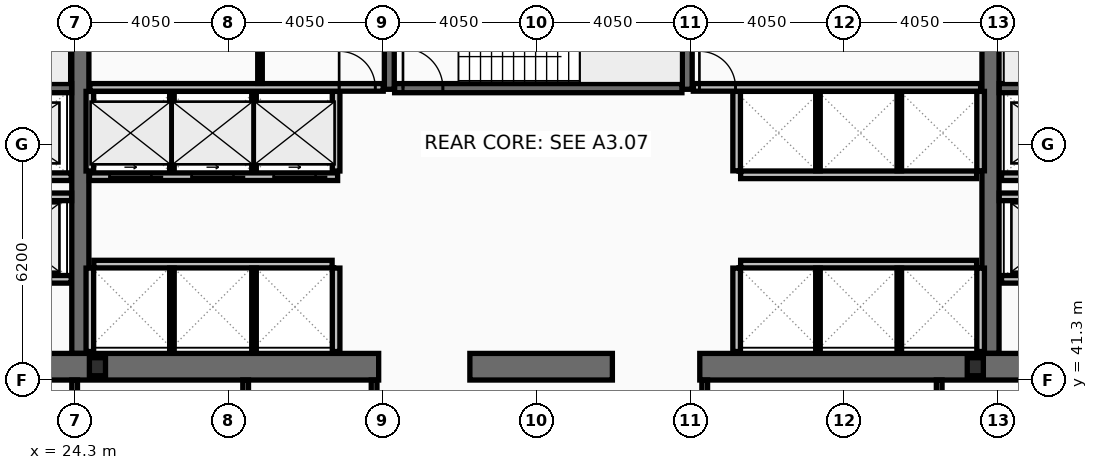
"""IFC4 building model, lengths in metres.
Left out: names, types, materials, properties, quantities, classifications, styles, units other than length and angle.
Written with IfcOpenShell. Run it as: python <this file> out.ifc"""

import sys

from ifc_helpers import new_model, si_unit, direction, frame, frame_2d, origin, origin_2d, place, context, subcontext, project, spatial, rectangle, i_section, extrude, element, fill, save


model = new_model("IFC4")
c1 = context("Model", 3, precision=1e-05, world=origin(), true_north=direction((0.0, 1.0)))
c2 = subcontext(c1, "Body", "Model", "MODEL_VIEW")
j1 = project(units=[si_unit("LENGTHUNIT", "METRE"), si_unit("PLANEANGLEUNIT", "RADIAN")], contexts=[c1])
p1 = place(None, origin())
s1 = spatial("IfcSite", under=j1, at=p1, CompositionType="ELEMENT")
p2 = place(p1, origin())
s2 = spatial("IfcBuilding", under=s1, at=p2, CompositionType="ELEMENT")
p3 = place(p2, frame((0.0, 0.0, 94.6)))
s3 = spatial("IfcBuildingStorey", under=s2, at=p3, CompositionType="ELEMENT", Elevation=94.6)
for number, where, z_axis, x_axis in (
    (1, (24.45, 42.0, 0.0), (0.0, 0.0, 1.0), (0.0, 1.0, 0.0)),
    (2, (48.4, 42.0, 0.0), (0.0, 0.0, 1.0), (0.0, 1.0, 0.0)),
):
    element("IfcWall", number, at=place(p3, frame(where, z_axis=z_axis, x_axis=x_axis)), inside=s3, PredefinedType="SHEAR", context=c2, shape_type="SweptSolid", body=[
        extrude(rectangle(XDim=11.0, YDim=0.45, at=frame_2d((5.5, 0.0))), origin(), (0.0, 0.0, 1.0), 3.82),
    ])
p4 = place(p3, frame((32.3, 41.65, 0.0), z_axis=(0.0, 0.0, 1.0), x_axis=(-1.0, 0.0, 0.0)))
e3 = element("IfcWall", 3, at=p4, inside=s3, PredefinedType="SHEAR", context=c2, shape_type="SweptSolid", body=[
    extrude(rectangle(XDim=11.45, YDim=0.7, at=frame_2d((5.725, 0.0))), origin(), (0.0, 0.0, 1.0), 3.82),
])
p5 = place(p3, frame((38.45, 41.65, 0.0), z_axis=(0.0, 0.0, 1.0), x_axis=(-1.0, 0.0, 0.0)))
e4 = element("IfcWall", 4, at=p5, inside=s3, PredefinedType="SHEAR", context=c2, shape_type="SweptSolid", body=[
    extrude(rectangle(XDim=3.75, YDim=0.7, at=frame_2d((1.875, 0.0))), origin(), (0.0, 0.0, 1.0), 3.82),
])
p6 = place(p3, frame((52.05, 41.65, 0.0), z_axis=(0.0, 0.0, 1.0), x_axis=(-1.0, 0.0, 0.0)))
e5 = element("IfcWall", 5, at=p6, inside=s3, PredefinedType="SHEAR", context=c2, shape_type="SweptSolid", body=[
    extrude(rectangle(XDim=11.3, YDim=0.7, at=frame_2d((5.65, 0.0))), origin(), (0.0, 0.0, 1.0), 3.82),
])
for number, where, z_axis, x_axis in (
    (6, (32.58, 48.95, 0.0), (0.0, 0.0, 1.0), (0.0, 1.0, 0.0)),
    (7, (40.42, 48.95, 0.0), (0.0, 0.0, 1.0), (0.0, 1.0, 0.0)),
):
    element("IfcWall", number, at=place(p3, frame(where, z_axis=z_axis, x_axis=x_axis)), inside=s3, PredefinedType="SHEAR", context=c2, shape_type="SweptSolid", body=[
        extrude(rectangle(XDim=4.05, YDim=0.26, at=frame_2d((2.025, 0.0))), origin(), (0.0, 0.0, 1.0), 3.82),
    ])
p7 = place(p3, frame((16.9, 48.98, 0.0), z_axis=(0.0, 0.0, 1.0), x_axis=(1.0, 0.0, 0.0)))
e8 = element("IfcWall", 8, at=p7, inside=s3, PredefinedType="SHEAR", context=c2, shape_type="SweptSolid", body=[
    extrude(rectangle(XDim=7.32, YDim=0.24, at=frame_2d((3.66, 0.0))), origin(), (0.0, 0.0, 1.0), 3.82),
])
p8 = place(p7, frame((0.22, 0.0, 0.0)))
e9 = element("IfcOpeningElement", 9, at=p8, cuts=e8, PredefinedType="OPENING", context=c2, shape_type="SweptSolid", body=[
    extrude(rectangle(XDim=1.05, YDim=2.15, at=frame_2d((0.525, 1.075))), frame((0.0, 0.13, 0.0), z_axis=(0.0, -1.0, 0.0), x_axis=(1.0, 0.0, 0.0)), (0.0, 0.0, 1.0), 0.26),
])
p9 = place(p3, frame((48.63, 48.98, 0.0), z_axis=(0.0, 0.0, 1.0), x_axis=(1.0, 0.0, 0.0)))
e10 = element("IfcWall", 10, at=p9, inside=s3, PredefinedType="SHEAR", context=c2, shape_type="SweptSolid", body=[
    extrude(rectangle(XDim=7.37, YDim=0.24, at=frame_2d((3.685, 0.0))), origin(), (0.0, 0.0, 1.0), 3.82),
])
p10 = place(p9, frame((6.1, 0.0, 0.0)))
e11 = element("IfcOpeningElement", 11, at=p10, cuts=e10, PredefinedType="OPENING", context=c2, shape_type="SweptSolid", body=[
    extrude(rectangle(XDim=1.05, YDim=2.15, at=frame_2d((0.525, 1.075))), frame((0.0, 0.13, 0.0), z_axis=(0.0, -1.0, 0.0), x_axis=(1.0, 0.0, 0.0)), (0.0, 0.0, 1.0), 0.26),
])
p11 = place(p3, frame((32.72, 48.98, 0.0), z_axis=(0.0, 0.0, 1.0), x_axis=(1.0, 0.0, 0.0)))
e12 = element("IfcWall", 12, at=p11, inside=s3, PredefinedType="SHEAR", context=c2, shape_type="SweptSolid", body=[
    extrude(rectangle(XDim=7.56, YDim=0.24, at=frame_2d((3.78, 0.0))), origin(), (0.0, 0.0, 1.0), 3.82),
])
p12 = place(p11, frame((0.22, 0.0, 0.0)))
e13 = element("IfcOpeningElement", 13, at=p12, cuts=e12, PredefinedType="OPENING", context=c2, shape_type="SweptSolid", body=[
    extrude(rectangle(XDim=1.05, YDim=2.15, at=frame_2d((0.525, 1.075))), frame((0.0, 0.13, 0.0), z_axis=(0.0, -1.0, 0.0), x_axis=(1.0, 0.0, 0.0)), (0.0, 0.0, 1.0), 0.26),
])
for number, where, z_axis, x_axis in (
    (14, (24.9, 41.65, 0.0), (0.0, 0.0, 1.0), (1.0, 0.0, 0.0)),
    (15, (48.0, 41.65, 0.0), (0.0, 0.0, 1.0), (1.0, 0.0, 0.0)),
):
    element("IfcColumn", number, at=place(p3, frame(where, z_axis=z_axis, x_axis=x_axis)), inside=s3, PredefinedType="COLUMN", context=c2, shape_type="SweptSolid", body=[
        extrude(i_section(OverallWidth=0.424, OverallDepth=0.474, WebThickness=0.048, FlangeThickness=0.077, at=origin_2d()), origin(), (0.0, 0.0, 1.0), 4.0),
    ])
p13 = place(p3, frame((51.61, 43.95, 0.0), z_axis=(0.0, 0.0, 1.0), x_axis=(-1.0, 0.0, 0.0)))
e16 = element("IfcWall", 16, at=p13, inside=s3, PredefinedType="PARTITIONING", context=c2, shape_type="SweptSolid", body=[
    extrude(rectangle(XDim=2.92, YDim=0.2, at=frame_2d((1.46, 0.0))), origin(), (0.0, 0.0, 1.0), 3.82),
])
p14 = place(p13, frame((0.81, 0.0, 0.0)))
e17 = element("IfcOpeningElement", 17, at=p14, cuts=e16, PredefinedType="OPENING", context=c2, shape_type="SweptSolid", body=[
    extrude(rectangle(XDim=1.3, YDim=2.18, at=frame_2d((0.65, 1.09))), frame((0.0, 0.11, 0.0), z_axis=(0.0, -1.0, 0.0), x_axis=(1.0, 0.0, 0.0)), (0.0, 0.0, 1.0), 0.22),
])
p15 = place(p3, frame((24.21, 43.95, 0.0), z_axis=(0.0, 0.0, 1.0), x_axis=(-1.0, 0.0, 0.0)))
e18 = element("IfcWall", 18, at=p15, inside=s3, PredefinedType="PARTITIONING", context=c2, shape_type="SweptSolid", body=[
    extrude(rectangle(XDim=2.97, YDim=0.2, at=frame_2d((1.485, 0.0))), origin(), (0.0, 0.0, 1.0), 3.82),
])
p16 = place(p15, frame((0.86, 0.0, 0.0)))
e19 = element("IfcOpeningElement", 19, at=p16, cuts=e18, PredefinedType="OPENING", context=c2, shape_type="SweptSolid", body=[
    extrude(rectangle(XDim=1.3, YDim=2.18, at=frame_2d((0.65, 1.09))), frame((0.0, 0.11, 0.0), z_axis=(0.0, -1.0, 0.0), x_axis=(1.0, 0.0, 0.0)), (0.0, 0.0, 1.0), 0.22),
])
p17 = place(p3, frame((51.61, 46.65, 0.0), z_axis=(0.0, 0.0, 1.0), x_axis=(-1.0, 0.0, 0.0)))
e20 = element("IfcWall", 20, at=p17, inside=s3, PredefinedType="PARTITIONING", context=c2, shape_type="SweptSolid", body=[
    extrude(rectangle(XDim=2.92, YDim=0.2, at=frame_2d((1.46, 0.0))), origin(), (0.0, 0.0, 1.0), 3.82),
])
p18 = place(p17, frame((0.86, 0.0, 0.0)))
e21 = element("IfcOpeningElement", 21, at=p18, cuts=e20, PredefinedType="OPENING", context=c2, shape_type="SweptSolid", body=[
    extrude(rectangle(XDim=1.2, YDim=2.18, at=frame_2d((0.6, 1.09))), frame((0.0, 0.11, 0.0), z_axis=(0.0, -1.0, 0.0), x_axis=(1.0, 0.0, 0.0)), (0.0, 0.0, 1.0), 0.22),
])
p19 = place(p3, frame((24.21, 46.65, 0.0), z_axis=(0.0, 0.0, 1.0), x_axis=(-1.0, 0.0, 0.0)))
e22 = element("IfcWall", 22, at=p19, inside=s3, PredefinedType="PARTITIONING", context=c2, shape_type="SweptSolid", body=[
    extrude(rectangle(XDim=2.97, YDim=0.2, at=frame_2d((1.485, 0.0))), origin(), (0.0, 0.0, 1.0), 3.82),
])
p20 = place(p19, frame((0.91, 0.0, 0.0)))
e23 = element("IfcOpeningElement", 23, at=p20, cuts=e22, PredefinedType="OPENING", context=c2, shape_type="SweptSolid", body=[
    extrude(rectangle(XDim=1.2, YDim=2.18, at=frame_2d((0.6, 1.09))), frame((0.0, 0.11, 0.0), z_axis=(0.0, -1.0, 0.0), x_axis=(1.0, 0.0, 0.0)), (0.0, 0.0, 1.0), 0.22),
])
p21 = place(p3, frame((31.22, 46.65, 0.0), z_axis=(0.0, 0.0, 1.0), x_axis=(-1.0, 0.0, 0.0)))
e24 = element("IfcWall", 24, at=p21, inside=s3, PredefinedType="PARTITIONING", context=c2, shape_type="SweptSolid", body=[
    extrude(rectangle(XDim=6.53, YDim=0.2, at=frame_2d((3.265, 0.0))), origin(), (0.0, 0.0, 1.0), 3.82),
])
p22 = place(p21, frame((4.9, 0.0, 0.0)))
e25 = element("IfcOpeningElement", 25, at=p22, cuts=e24, PredefinedType="OPENING", context=c2, shape_type="SweptSolid", body=[
    extrude(rectangle(XDim=1.1, YDim=2.18, at=frame_2d((0.55, 1.09))), frame((0.0, 0.11, 0.0), z_axis=(0.0, -1.0, 0.0), x_axis=(1.0, 0.0, 0.0)), (0.0, 0.0, 1.0), 0.22),
])
p23 = place(p21, frame((2.74, 0.0, 0.0)))
e26 = element("IfcOpeningElement", 26, at=p23, cuts=e24, PredefinedType="OPENING", context=c2, shape_type="SweptSolid", body=[
    extrude(rectangle(XDim=1.1, YDim=2.18, at=frame_2d((0.55, 1.09))), frame((0.0, 0.11, 0.0), z_axis=(0.0, -1.0, 0.0), x_axis=(1.0, 0.0, 0.0)), (0.0, 0.0, 1.0), 0.22),
])
p24 = place(p21, frame((0.58, 0.0, 0.0)))
e27 = element("IfcOpeningElement", 27, at=p24, cuts=e24, PredefinedType="OPENING", context=c2, shape_type="SweptSolid", body=[
    extrude(rectangle(XDim=1.1, YDim=2.18, at=frame_2d((0.55, 1.09))), frame((0.0, 0.11, 0.0), z_axis=(0.0, -1.0, 0.0), x_axis=(1.0, 0.0, 0.0)), (0.0, 0.0, 1.0), 0.22),
])
p25 = place(p3, frame((21.2, 46.12, 0.0), z_axis=(0.0, 0.0, 1.0), x_axis=(1.0, 0.0, 0.0)))
e28 = element("IfcWall", 28, at=p25, inside=s3, PredefinedType="PARTITIONING", context=c2, shape_type="SweptSolid", body=[
    extrude(rectangle(XDim=3.02, YDim=0.2, at=frame_2d((1.51, 0.0))), origin(), (0.0, 0.0, 1.0), 3.82),
])
p26 = place(p3, frame((48.63, 46.12, 0.0), z_axis=(0.0, 0.0, 1.0), x_axis=(1.0, 0.0, 0.0)))
e29 = element("IfcWall", 29, at=p26, inside=s3, PredefinedType="PARTITIONING", context=c2, shape_type="SweptSolid", body=[
    extrude(rectangle(XDim=3.07, YDim=0.2, at=frame_2d((1.535, 0.0))), origin(), (0.0, 0.0, 1.0), 3.82),
])
for number, where, z_axis, x_axis in (
    (30, (24.7, 46.8, 0.0), (0.0, 0.0, 1.0), (0.0, 1.0, 0.0)),
    (31, (31.18, 46.8, 0.0), (0.0, 0.0, 1.0), (0.0, 1.0, 0.0)),
):
    element("IfcWall", number, at=place(p3, frame(where, z_axis=z_axis, x_axis=x_axis)), inside=s3, PredefinedType="PARTITIONING", context=c2, shape_type="SweptSolid", body=[
        extrude(rectangle(XDim=2.095, YDim=0.2, at=frame_2d((1.047, 0.0))), origin(), (0.0, 0.0, 1.0), 3.82),
    ])
for number, where, z_axis, x_axis in (
    (32, (26.86, 46.8, 0.0), (0.0, 0.0, 1.0), (0.0, 1.0, 0.0)),
    (33, (29.02, 46.8, 0.0), (0.0, 0.0, 1.0), (0.0, 1.0, 0.0)),
):
    element("IfcWall", number, at=place(p3, frame(where, z_axis=z_axis, x_axis=x_axis)), inside=s3, PredefinedType="PARTITIONING", context=c2, shape_type="SweptSolid", body=[
        extrude(rectangle(XDim=2.095, YDim=0.12, at=frame_2d((1.047, 0.0))), origin(), (0.0, 0.0, 1.0), 3.82),
    ])
p27 = place(p3, frame((24.805, 44.35, 0.0), z_axis=(0.0, 0.0, 1.0), x_axis=(1.0, 0.0, 0.0)))
e34 = element("IfcWall", 34, at=p27, inside=s3, PredefinedType="PARTITIONING", context=c2, shape_type="SweptSolid", body=[
    extrude(rectangle(XDim=6.27, YDim=0.2, at=frame_2d((3.135, 0.0))), origin(), (0.0, 0.0, 1.0), 3.82),
])
for number, where, z_axis, x_axis in (
    (35, (24.7, 42.05, 0.0), (0.0, 0.0, 1.0), (0.0, 1.0, 0.0)),
    (36, (31.18, 42.05, 0.0), (0.0, 0.0, 1.0), (0.0, 1.0, 0.0)),
):
    element("IfcWall", number, at=place(p3, frame(where, z_axis=z_axis, x_axis=x_axis)), inside=s3, PredefinedType="PARTITIONING", context=c2, shape_type="SweptSolid", body=[
        extrude(rectangle(XDim=2.195, YDim=0.2, at=frame_2d((1.098, 0.0))), origin(), (0.0, 0.0, 1.0), 3.82),
    ])
for number, where, z_axis, x_axis in (
    (37, (26.86, 42.05, 0.0), (0.0, 0.0, 1.0), (0.0, 1.0, 0.0)),
    (38, (29.02, 42.05, 0.0), (0.0, 0.0, 1.0), (0.0, 1.0, 0.0)),
):
    element("IfcWall", number, at=place(p3, frame(where, z_axis=z_axis, x_axis=x_axis)), inside=s3, PredefinedType="PARTITIONING", context=c2, shape_type="SweptSolid", body=[
        extrude(rectangle(XDim=2.195, YDim=0.12, at=frame_2d((1.098, 0.0))), origin(), (0.0, 0.0, 1.0), 3.82),
    ])
p28 = place(p3, frame((41.825, 46.7, 0.0), z_axis=(0.0, 0.0, 1.0), x_axis=(1.0, 0.0, 0.0)))
e39 = element("IfcWall", 39, at=p28, inside=s3, PredefinedType="PARTITIONING", context=c2, shape_type="SweptSolid", body=[
    extrude(rectangle(XDim=6.21, YDim=0.2, at=frame_2d((3.105, 0.0))), origin(), (0.0, 0.0, 1.0), 3.82),
])
for number, where, z_axis, x_axis in (
    (40, (41.72, 46.805, 0.0), (0.0, 0.0, 1.0), (0.0, 1.0, 0.0)),
    (41, (48.14, 46.805, 0.0), (0.0, 0.0, 1.0), (0.0, 1.0, 0.0)),
):
    element("IfcWall", number, at=place(p3, frame(where, z_axis=z_axis, x_axis=x_axis)), inside=s3, PredefinedType="PARTITIONING", context=c2, shape_type="SweptSolid", body=[
        extrude(rectangle(XDim=2.09, YDim=0.2, at=frame_2d((1.045, 0.0))), origin(), (0.0, 0.0, 1.0), 3.82),
    ])
for number, where, z_axis, x_axis in (
    (42, (43.86, 46.805, 0.0), (0.0, 0.0, 1.0), (0.0, 1.0, 0.0)),
    (43, (46.0, 46.805, 0.0), (0.0, 0.0, 1.0), (0.0, 1.0, 0.0)),
):
    element("IfcWall", number, at=place(p3, frame(where, z_axis=z_axis, x_axis=x_axis)), inside=s3, PredefinedType="PARTITIONING", context=c2, shape_type="SweptSolid", body=[
        extrude(rectangle(XDim=2.09, YDim=0.12, at=frame_2d((1.045, 0.0))), origin(), (0.0, 0.0, 1.0), 3.82),
    ])
p29 = place(p3, frame((41.825, 44.35, 0.0), z_axis=(0.0, 0.0, 1.0), x_axis=(1.0, 0.0, 0.0)))
e44 = element("IfcWall", 44, at=p29, inside=s3, PredefinedType="PARTITIONING", context=c2, shape_type="SweptSolid", body=[
    extrude(rectangle(XDim=6.21, YDim=0.2, at=frame_2d((3.105, 0.0))), origin(), (0.0, 0.0, 1.0), 3.82),
])
for number, where, z_axis, x_axis in (
    (45, (41.72, 42.05, 0.0), (0.0, 0.0, 1.0), (0.0, 1.0, 0.0)),
    (46, (48.14, 42.05, 0.0), (0.0, 0.0, 1.0), (0.0, 1.0, 0.0)),
):
    element("IfcWall", number, at=place(p3, frame(where, z_axis=z_axis, x_axis=x_axis)), inside=s3, PredefinedType="PARTITIONING", context=c2, shape_type="SweptSolid", body=[
        extrude(rectangle(XDim=2.195, YDim=0.2, at=frame_2d((1.098, 0.0))), origin(), (0.0, 0.0, 1.0), 3.82),
    ])
for number, where, z_axis, x_axis in (
    (47, (43.86, 42.05, 0.0), (0.0, 0.0, 1.0), (0.0, 1.0, 0.0)),
    (48, (46.0, 42.05, 0.0), (0.0, 0.0, 1.0), (0.0, 1.0, 0.0)),
):
    element("IfcWall", number, at=place(p3, frame(where, z_axis=z_axis, x_axis=x_axis)), inside=s3, PredefinedType="PARTITIONING", context=c2, shape_type="SweptSolid", body=[
        extrude(rectangle(XDim=2.195, YDim=0.12, at=frame_2d((1.098, 0.0))), origin(), (0.0, 0.0, 1.0), 3.82),
    ])
p30 = place(p3, frame((24.7, 49.0, 0.0), z_axis=(0.0, 0.0, 1.0), x_axis=(1.0, 0.0, 0.0)))
e49 = element("IfcWall", 49, at=p30, inside=s3, PredefinedType="PARTITIONING", context=c2, shape_type="SweptSolid", body=[
    extrude(rectangle(XDim=7.72, YDim=0.2, at=frame_2d((3.86, 0.0))), origin(), (0.0, 0.0, 1.0), 3.82),
])
p31 = place(p30, frame((6.56, 0.0, 0.0)))
e50 = element("IfcOpeningElement", 50, at=p31, cuts=e49, PredefinedType="OPENING", context=c2, shape_type="SweptSolid", body=[
    extrude(rectangle(XDim=0.95, YDim=2.1, at=frame_2d((0.475, 1.05))), frame((0.0, 0.11, 0.0), z_axis=(0.0, -1.0, 0.0), x_axis=(1.0, 0.0, 0.0)), (0.0, 0.0, 1.0), 0.22),
])
p32 = place(p3, frame((29.177, 49.105, 0.0), z_axis=(0.0, 0.0, 1.0), x_axis=(0.0, 1.0, 0.0)))
e51 = element("IfcWall", 51, at=p32, inside=s3, PredefinedType="PARTITIONING", context=c2, shape_type="SweptSolid", body=[
    extrude(rectangle(XDim=3.69, YDim=0.12, at=frame_2d((1.845, 0.0))), origin(), (0.0, 0.0, 1.0), 3.82),
])
p33 = place(p32, frame((1.05, 0.0, 0.0)))
e52 = element("IfcOpeningElement", 52, at=p33, cuts=e51, PredefinedType="OPENING", context=c2, shape_type="SweptSolid", body=[
    extrude(rectangle(XDim=0.9, YDim=2.05, at=frame_2d((0.45, 1.025))), frame((0.0, 0.07, 0.0), z_axis=(0.0, -1.0, 0.0), x_axis=(1.0, 0.0, 0.0)), (0.0, 0.0, 1.0), 0.14),
])
p34 = place(p3, frame((40.58, 49.0, 0.0), z_axis=(0.0, 0.0, 1.0), x_axis=(1.0, 0.0, 0.0)))
e53 = element("IfcWall", 53, at=p34, inside=s3, PredefinedType="PARTITIONING", context=c2, shape_type="SweptSolid", body=[
    extrude(rectangle(XDim=7.56, YDim=0.2, at=frame_2d((3.78, 0.0))), origin(), (0.0, 0.0, 1.0), 3.82),
])
p35 = place(p34, frame((0.16, 0.0, 0.0)))
e54 = element("IfcOpeningElement", 54, at=p35, cuts=e53, PredefinedType="OPENING", context=c2, shape_type="SweptSolid", body=[
    extrude(rectangle(XDim=0.95, YDim=2.1, at=frame_2d((0.475, 1.05))), frame((0.0, 0.11, 0.0), z_axis=(0.0, -1.0, 0.0), x_axis=(1.0, 0.0, 0.0)), (0.0, 0.0, 1.0), 0.22),
])
for number, where, z_axis, x_axis in (
    (55, (24.3, 38.28, 0.0), (0.0, 0.0, 1.0), (0.0, 1.0, 0.0)),
    (56, (28.8, 38.28, 0.0), (0.0, 0.0, 1.0), (0.0, 1.0, 0.0)),
    (57, (32.18, 38.28, 0.0), (0.0, 0.0, 1.0), (0.0, 1.0, 0.0)),
    (58, (40.88, 38.28, 0.0), (0.0, 0.0, 1.0), (0.0, 1.0, 0.0)),
    (59, (47.05, 38.28, 0.0), (0.0, 0.0, 1.0), (0.0, 1.0, 0.0)),
):
    element("IfcWall", number, at=place(p3, frame(where, z_axis=z_axis, x_axis=x_axis)), inside=s3, PredefinedType="PARTITIONING", context=c2, shape_type="SweptSolid", body=[
        extrude(rectangle(XDim=3.02, YDim=0.15, at=frame_2d((1.51, 0.0))), origin(), (0.0, 0.0, 1.0), 3.82),
    ])
p36 = place(p12, origin())
e60 = element("IfcDoor", 60, at=p36, inside=s3, OperationType="SINGLE_SWING_LEFT", PredefinedType="DOOR", context=c2, shape_type="SweptSolid", body=[
    extrude(rectangle(XDim=1.05, YDim=2.15, at=frame_2d((0.525, 1.075))), frame((0.0, 0.025, 0.0), z_axis=(0.0, -1.0, 0.0), x_axis=(1.0, 0.0, 0.0)), (0.0, 0.0, 1.0), 0.05),
])
fill(e13, e60)
p37 = place(p22, origin())
e61 = element("IfcDoor", 61, at=p37, inside=s3, OperationType="SLIDING_TO_LEFT", PredefinedType="DOOR", context=c2, shape_type="SweptSolid", body=[
    extrude(rectangle(XDim=1.1, YDim=2.18, at=frame_2d((0.55, 1.09))), frame((0.0, 0.025, 0.0), z_axis=(0.0, -1.0, 0.0), x_axis=(1.0, 0.0, 0.0)), (0.0, 0.0, 1.0), 0.05),
])
fill(e25, e61)
p38 = place(p23, origin())
e62 = element("IfcDoor", 62, at=p38, inside=s3, OperationType="SLIDING_TO_LEFT", PredefinedType="DOOR", context=c2, shape_type="SweptSolid", body=[
    extrude(rectangle(XDim=1.1, YDim=2.18, at=frame_2d((0.55, 1.09))), frame((0.0, 0.025, 0.0), z_axis=(0.0, -1.0, 0.0), x_axis=(1.0, 0.0, 0.0)), (0.0, 0.0, 1.0), 0.05),
])
fill(e26, e62)
p39 = place(p24, origin())
e63 = element("IfcDoor", 63, at=p39, inside=s3, OperationType="SLIDING_TO_LEFT", PredefinedType="DOOR", context=c2, shape_type="SweptSolid", body=[
    extrude(rectangle(XDim=1.1, YDim=2.18, at=frame_2d((0.55, 1.09))), frame((0.0, 0.025, 0.0), z_axis=(0.0, -1.0, 0.0), x_axis=(1.0, 0.0, 0.0)), (0.0, 0.0, 1.0), 0.05),
])
fill(e27, e63)
p40 = place(p31, origin())
e64 = element("IfcDoor", 64, at=p40, inside=s3, OperationType="SINGLE_SWING_LEFT", PredefinedType="DOOR", context=c2, shape_type="SweptSolid", body=[
    extrude(rectangle(XDim=0.95, YDim=2.1, at=frame_2d((0.475, 1.05))), frame((0.0, 0.025, 0.0), z_axis=(0.0, -1.0, 0.0), x_axis=(1.0, 0.0, 0.0)), (0.0, 0.0, 1.0), 0.05),
])
fill(e50, e64)
p41 = place(p35, origin())
e65 = element("IfcDoor", 65, at=p41, inside=s3, OperationType="SINGLE_SWING_LEFT", PredefinedType="DOOR", context=c2, shape_type="SweptSolid", body=[
    extrude(rectangle(XDim=0.95, YDim=2.1, at=frame_2d((0.475, 1.05))), frame((0.0, 0.025, 0.0), z_axis=(0.0, -1.0, 0.0), x_axis=(1.0, 0.0, 0.0)), (0.0, 0.0, 1.0), 0.05),
])
fill(e54, e65)
save(model, sys.argv[1])
